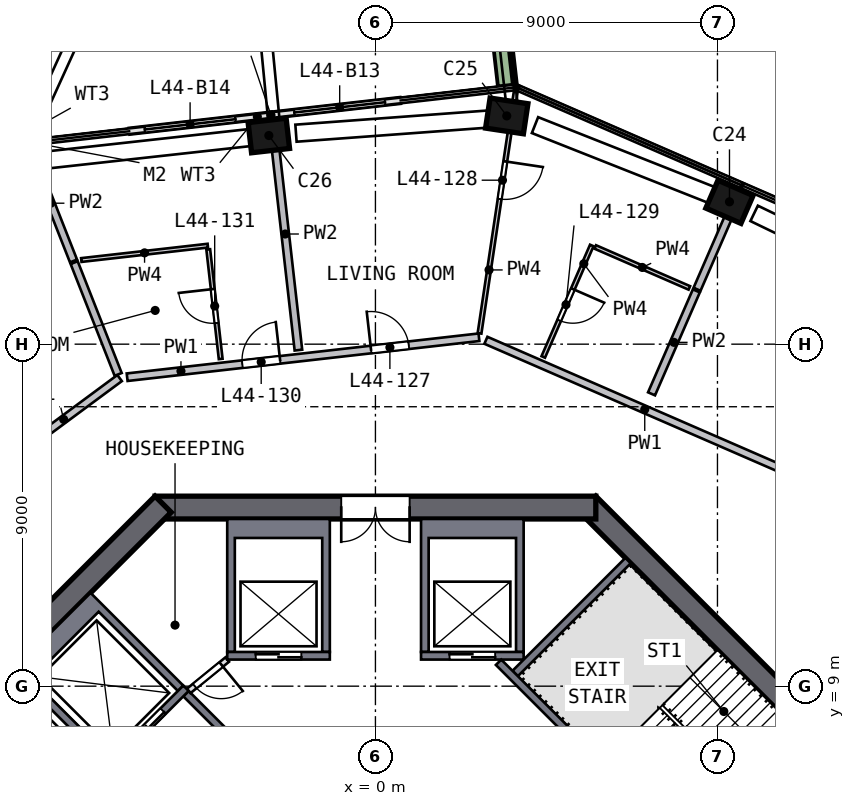
"""IFC4 building model, lengths in metres.
Left out: names, types, materials, properties, quantities, classifications, styles, units other than length and angle.
Written with IfcOpenShell. Run it as: python <this file> out.ifc"""

import sys

from ifc_helpers import new_model, si_unit, direction, frame, frame_2d, origin, origin_2d, place, context, subcontext, project, spatial, polyline, rectangle, outline, extrude, element, fill, save


model = new_model("IFC4")
c1 = context("Model", 3, precision=1e-05, world=origin(), true_north=direction((0.0, 1.0)))
c2 = subcontext(c1, "Body", "Model", "MODEL_VIEW")
j1 = project(units=[si_unit("LENGTHUNIT", "METRE"), si_unit("PLANEANGLEUNIT", "RADIAN")], contexts=[c1])
p1 = place(None, origin())
s1 = spatial("IfcSite", under=j1, at=p1, CompositionType="ELEMENT")
p2 = place(p1, origin())
s2 = spatial("IfcBuilding", under=s1, at=p2, CompositionType="ELEMENT")
p3 = place(p2, frame((0.0, 0.0, 183.5)))
s3 = spatial("IfcBuildingStorey", under=s2, at=p3, CompositionType="ELEMENT", Elevation=183.5)
p4 = place(p3, frame((9.441, 21.693, 0.0), z_axis=(-0.103577696, 0.044031928, 0.99364624), x_axis=(-0.911115934, 0.39648645, -0.112544433)))
e1 = element("IfcColumn", 1, at=p4, inside=s3, PredefinedType="COLUMN", context=c2, shape_type="SweptSolid", body=[
    extrude(rectangle(XDim=1.0, YDim=0.8, at=origin_2d()), origin(), (0.0, 0.0, 1.0), 3.21),
])
p5 = place(p3, frame((3.594, 23.987, 0.0), z_axis=(-0.114187915, 0.016117069, 0.993328425), x_axis=(0.982365713, -0.147173067, 0.115315628)))
e2 = element("IfcColumn", 2, at=p5, inside=s3, PredefinedType="COLUMN", context=c2, shape_type="SweptSolid", body=[
    extrude(rectangle(XDim=1.0, YDim=0.8, at=origin_2d()), origin(), (0.0, 0.0, 1.0), 3.211),
])
p6 = place(p3, frame((-2.67, 23.507, 0.0), z_axis=(-0.111714949, -0.013612645, 0.993647053), x_axis=(-0.987336251, -0.111814551, -0.112537254)))
e3 = element("IfcColumn", 3, at=p6, inside=s3, PredefinedType="COLUMN", context=c2, shape_type="SweptSolid", body=[
    extrude(rectangle(XDim=1.0, YDim=0.8, at=origin_2d()), origin(), (0.0, 0.0, 1.0), 3.21),
])
p7 = place(p3, frame((13.788, 5.587, 0.0), z_axis=(0.0, 0.0, 1.0), x_axis=(-0.707106781, 0.707106781, 0.0)))
e4 = element("IfcWall", 4, at=p7, inside=s3, PredefinedType="SHEAR", context=c2, shape_type="SweptSolid", body=[
    extrude(rectangle(XDim=11.598, YDim=0.6, at=frame_2d((5.799, 0.0))), origin(), (0.0, 0.0, 1.0), 3.5),
])
p8 = place(p7, frame((2.099, 0.0, 0.0)))
e5 = element("IfcOpeningElement", 5, at=p8, cuts=e4, PredefinedType="OPENING", context=c2, shape_type="SweptSolid", body=[
    extrude(rectangle(XDim=1.2, YDim=2.1, at=frame_2d((0.6, 1.05))), frame((0.0, 0.31, 0.0), z_axis=(0.0, -1.0, 0.0), x_axis=(1.0, 0.0, 0.0)), (0.0, 0.0, 1.0), 0.62),
])
p9 = place(p3, frame((5.799, 13.7, 0.0), z_axis=(0.0, 0.0, 1.0), x_axis=(-1.0, 0.0, 0.0)))
e6 = element("IfcWall", 6, at=p9, inside=s3, PredefinedType="SHEAR", context=c2, shape_type="SweptSolid", body=[
    extrude(rectangle(XDim=11.598, YDim=0.6, at=frame_2d((5.799, 0.0))), origin(), (0.0, 0.0, 1.0), 3.5),
])
p10 = place(p9, frame((4.899, 0.0, 0.0)))
e7 = element("IfcOpeningElement", 7, at=p10, cuts=e6, PredefinedType="OPENING", context=c2, shape_type="SweptSolid", body=[
    extrude(rectangle(XDim=1.8, YDim=2.1, at=frame_2d((0.9, 1.05))), frame((0.0, 0.31, 0.0), z_axis=(0.0, -1.0, 0.0), x_axis=(1.0, 0.0, 0.0)), (0.0, 0.0, 1.0), 0.62),
])
p11 = place(p3, frame((-5.587, 13.788, 0.0), z_axis=(0.0, 0.0, 1.0), x_axis=(-0.707106781, -0.707106781, 0.0)))
e8 = element("IfcWall", 8, at=p11, inside=s3, PredefinedType="SHEAR", context=c2, shape_type="SweptSolid", body=[
    extrude(rectangle(XDim=11.598, YDim=0.6, at=frame_2d((5.799, 0.0))), origin(), (0.0, 0.0, 1.0), 3.5),
])
p12 = place(p3, frame((0.649, 24.413, 0.0), z_axis=(0.0, 0.0, 1.0), x_axis=(-0.993608367, -0.112882298, 0.0)))
e9 = element("IfcWall", 9, at=p12, inside=s3, PredefinedType="SOLIDWALL", context=c2, shape_type="SweptSolid", body=[
    extrude(rectangle(XDim=3.4, YDim=0.15, at=frame_2d((1.7, 0.0))), origin(), (0.0, 0.0, 1.0), 2.475),
])
p13 = place(p12, frame((0.4, 0.0, 0.0)))
e10 = element("IfcOpeningElement", 10, at=p13, cuts=e9, PredefinedType="OPENING", context=c2, shape_type="SweptSolid", body=[
    extrude(rectangle(XDim=2.4, YDim=2.4, at=frame_2d((1.2, 1.2))), frame((0.0, 0.085, 0.0), z_axis=(0.0, -1.0, 0.0), x_axis=(1.0, 0.0, 0.0)), (0.0, 0.0, 1.0), 0.17),
])
p14 = place(p3, frame((-2.729, 24.029, 0.0), z_axis=(0.0, 0.0, 1.0), x_axis=(-0.993609226, -0.112874735, 0.0)))
e11 = element("IfcWall", 11, at=p14, inside=s3, PredefinedType="SOLIDWALL", context=c2, shape_type="SweptSolid", body=[
    extrude(rectangle(XDim=3.761, YDim=0.15, at=frame_2d((1.881, 0.0))), origin(), (0.0, 0.0, 1.0), 2.475),
])
p15 = place(p14, frame((0.961, 0.0, 0.0)))
e12 = element("IfcOpeningElement", 12, at=p15, cuts=e11, PredefinedType="OPENING", context=c2, shape_type="SweptSolid", body=[
    extrude(rectangle(XDim=2.4, YDim=2.4, at=frame_2d((1.2, 1.2))), frame((0.0, 0.085, 0.0), z_axis=(0.0, -1.0, 0.0), x_axis=(1.0, 0.0, 0.0)), (0.0, 0.0, 1.0), 0.17),
])
p16 = place(p3, frame((3.472, 24.81, 0.0), z_axis=(0.0, 0.0, 1.0), x_axis=(-0.112801803, 0.993617508, 0.0)))
e13 = element("IfcWall", 13, at=p16, inside=s3, PredefinedType="SOLIDWALL", context=c2, shape_type="SweptSolid", body=[
    extrude(rectangle(XDim=3.199, YDim=0.5, at=frame_2d((1.6, 0.0))), origin(), (0.0, 0.0, 1.0), 0.7),
])
p17 = place(p3, origin())
e14 = element("IfcWall", 14, at=p17, inside=s3, PredefinedType="SOLIDWALL", context=c2, shape_type="SweptSolid", body=[
    extrude(outline(polyline([(3.9, 9.9), (3.7, 9.9), (3.7, 12.9), (1.4, 12.9), (1.4, 9.9), (1.2, 9.9), (1.2, 13.4), (3.9, 13.4), (3.9, 9.9)])), origin(), (0.0, 0.0, 1.0), 3.19),
])
p18 = place(p3, frame((1.2, 9.8, 0.0), z_axis=(0.0, 0.0, 1.0), x_axis=(1.0, 0.0, 0.0)))
e15 = element("IfcWall", 15, at=p18, inside=s3, PredefinedType="SOLIDWALL", context=c2, shape_type="SweptSolid", body=[
    extrude(rectangle(XDim=2.7, YDim=0.2, at=frame_2d((1.35, 0.0))), origin(), (0.0, 0.0, 1.0), 3.19),
])
p19 = place(p18, frame((0.75, 0.0, 0.0)))
e16 = element("IfcOpeningElement", 16, at=p19, cuts=e15, PredefinedType="OPENING", context=c2, shape_type="SweptSolid", body=[
    extrude(rectangle(XDim=1.2, YDim=2.1, at=frame_2d((0.6, 1.05))), frame((0.0, 0.11, 0.0), z_axis=(0.0, -1.0, 0.0), x_axis=(1.0, 0.0, 0.0)), (0.0, 0.0, 1.0), 0.22),
])
p20 = place(p3, origin())
e17 = element("IfcWall", 17, at=p20, inside=s3, PredefinedType="SOLIDWALL", context=c2, shape_type="SweptSolid", body=[
    extrude(outline(polyline([(-3.9, 13.4), (-1.2, 13.4), (-1.2, 9.9), (-1.4, 9.9), (-1.4, 12.9), (-3.7, 12.9), (-3.7, 9.9), (-3.9, 9.9), (-3.9, 13.4)])), origin(), (0.0, 0.0, 1.0), 3.19),
])
p21 = place(p3, frame((-1.2, 9.8, 0.0), z_axis=(0.0, 0.0, 1.0), x_axis=(-1.0, 0.0, 0.0)))
e18 = element("IfcWall", 18, at=p21, inside=s3, PredefinedType="SOLIDWALL", context=c2, shape_type="SweptSolid", body=[
    extrude(rectangle(XDim=2.7, YDim=0.2, at=frame_2d((1.35, 0.0))), origin(), (0.0, 0.0, 1.0), 3.19),
])
p22 = place(p21, frame((0.75, 0.0, 0.0)))
e19 = element("IfcOpeningElement", 19, at=p22, cuts=e18, PredefinedType="OPENING", context=c2, shape_type="SweptSolid", body=[
    extrude(rectangle(XDim=1.2, YDim=2.1, at=frame_2d((0.6, 1.05))), frame((0.0, 0.11, 0.0), z_axis=(0.0, -1.0, 0.0), x_axis=(1.0, 0.0, 0.0)), (0.0, 0.0, 1.0), 0.22),
])
p23 = place(p3, origin())
e20 = element("IfcWall", 20, at=p23, inside=s3, PredefinedType="SOLIDWALL", context=c2, shape_type="SweptSolid", body=[
    extrude(outline(polyline([(-9.546, 9.405), (-7.495, 11.455), (-5.056, 9.016), (-5.197, 8.874), (-7.283, 10.96), (-9.051, 9.192), (-6.965, 7.106), (-7.106, 6.965), (-9.546, 9.405)])), origin(), (0.0, 0.0, 1.0), 3.19),
])
p24 = place(p3, frame((-4.985, 8.945, 0.0), z_axis=(0.0, 0.0, 1.0), x_axis=(-0.707106781, -0.707106781, 0.0)))
e21 = element("IfcWall", 21, at=p24, inside=s3, PredefinedType="SOLIDWALL", context=c2, shape_type="SweptSolid", body=[
    extrude(rectangle(XDim=2.9, YDim=0.2, at=frame_2d((1.45, 0.0))), origin(), (0.0, 0.0, 1.0), 3.19),
])
p25 = place(p24, frame((0.85, 0.0, 0.0)))
e22 = element("IfcOpeningElement", 22, at=p25, cuts=e21, PredefinedType="OPENING", context=c2, shape_type="SweptSolid", body=[
    extrude(rectangle(XDim=1.2, YDim=2.1, at=frame_2d((0.6, 1.05))), frame((0.0, 0.11, 0.0), z_axis=(0.0, -1.0, 0.0), x_axis=(1.0, 0.0, 0.0)), (0.0, 0.0, 1.0), 0.22),
])
p26 = place(p3, frame((3.24, 9.629, 0.0), z_axis=(0.0, 0.0, 1.0), x_axis=(0.707106781, -0.707106781, 0.0)))
e23 = element("IfcWall", 23, at=p26, inside=s3, PredefinedType="SOLIDWALL", context=c2, shape_type="SweptSolid", body=[
    extrude(rectangle(XDim=9.036, YDim=0.2, at=frame_2d((4.518, 0.0))), origin(), (0.0, 0.0, 1.0), 3.19),
])
p27 = place(p26, frame((7.018, 0.0, 0.0)))
e24 = element("IfcOpeningElement", 24, at=p27, cuts=e23, PredefinedType="OPENING", context=c2, shape_type="SweptSolid", body=[
    extrude(rectangle(XDim=1.2, YDim=2.1, at=frame_2d((0.6, 1.05))), frame((0.0, 0.11, 0.0), z_axis=(0.0, -1.0, 0.0), x_axis=(1.0, 0.0, 0.0)), (0.0, 0.0, 1.0), 0.22),
])
p28 = place(p3, frame((3.677, 9.334, 0.0), z_axis=(0.0, 0.0, 1.0), x_axis=(0.707077716, 0.707135845, 0.0)))
e25 = element("IfcWall", 25, at=p28, inside=s3, PredefinedType="SOLIDWALL", context=c2, shape_type="SweptSolid", body=[
    extrude(rectangle(XDim=4.2, YDim=0.2, at=frame_2d((2.1, 0.0))), origin(), (0.0, 0.0, 1.0), 3.19),
])
p29 = place(p3, frame((-3.005, 6.823, 0.0), z_axis=(0.0, 0.0, 1.0), x_axis=(-0.707106781, 0.707106781, 0.0)))
e26 = element("IfcWall", 26, at=p29, inside=s3, PredefinedType="SOLIDWALL", context=c2, shape_type="SweptSolid", body=[
    extrude(rectangle(XDim=2.8, YDim=0.2, at=frame_2d((1.4, 0.0))), origin(), (0.0, 0.0, 1.0), 3.19),
])
p30 = place(p3, frame((-3.9, 9.7, 0.0), z_axis=(0.0, 0.0, 1.0), x_axis=(-0.775559878, -0.631274009, 0.0)))
e27 = element("IfcWall", 27, at=p30, inside=s3, PredefinedType="PARTITIONING", context=c2, shape_type="SweptSolid", body=[
    extrude(rectangle(XDim=1.308, YDim=0.15, at=frame_2d((0.654, 0.0))), origin(), (0.0, 0.0, 1.0), 3.19),
])
p31 = place(p30, frame((0.204, 0.0, 0.0)))
e28 = element("IfcOpeningElement", 28, at=p31, cuts=e27, PredefinedType="OPENING", context=c2, shape_type="SweptSolid", body=[
    extrude(rectangle(XDim=0.9, YDim=2.1, at=frame_2d((0.45, 1.05))), frame((0.0, 0.085, 0.0), z_axis=(0.0, -1.0, 0.0), x_axis=(1.0, 0.0, 0.0)), (0.0, 0.0, 1.0), 0.17),
])
p32 = place(p3, frame((-14.384, 11.45, 0.0), z_axis=(0.0, 0.0, 1.0), x_axis=(0.804051366, 0.594559838, 0.0)))
e29 = element("IfcWall", 29, at=p32, inside=s3, PredefinedType="SOLIDWALL", context=c2, shape_type="SweptSolid", body=[
    extrude(rectangle(XDim=9.517, YDim=0.2, at=frame_2d((4.758, 0.0))), origin(), (0.0, 0.0, 1.0), 3.19),
])
p33 = place(p32, frame((3.857, 0.0, 0.0)))
e30 = element("IfcOpeningElement", 30, at=p33, cuts=e29, PredefinedType="OPENING", context=c2, shape_type="SweptSolid", body=[
    extrude(rectangle(XDim=1.8, YDim=2.1, at=frame_2d((0.9, 1.05))), frame((0.0, 0.11, 0.0), z_axis=(0.0, -1.0, 0.0), x_axis=(1.0, 0.0, 0.0)), (0.0, 0.0, 1.0), 0.22),
])
p34 = place(p3, frame((-6.533, 17.13, 0.0), z_axis=(0.0, 0.0, 1.0), x_axis=(0.993610399, 0.112864414, 0.0)))
e31 = element("IfcWall", 31, at=p34, inside=s3, PredefinedType="SOLIDWALL", context=c2, shape_type="SweptSolid", body=[
    extrude(rectangle(XDim=9.317, YDim=0.2, at=frame_2d((4.658, 0.0))), origin(), (0.0, 0.0, 1.0), 3.19),
])
p35 = place(p34, frame((6.458, 0.0, 0.0)))
e32 = element("IfcOpeningElement", 32, at=p35, cuts=e31, PredefinedType="OPENING", context=c2, shape_type="SweptSolid", body=[
    extrude(rectangle(XDim=1.0, YDim=2.1, at=frame_2d((0.5, 1.05))), frame((0.0, 0.11, 0.0), z_axis=(0.0, -1.0, 0.0), x_axis=(1.0, 0.0, 0.0)), (0.0, 0.0, 1.0), 0.22),
])
p36 = place(p34, frame((3.05, 0.0, 0.0)))
e33 = element("IfcOpeningElement", 33, at=p36, cuts=e31, PredefinedType="OPENING", context=c2, shape_type="SweptSolid", body=[
    extrude(rectangle(XDim=1.0, YDim=2.1, at=frame_2d((0.5, 1.05))), frame((0.0, 0.11, 0.0), z_axis=(0.0, -1.0, 0.0), x_axis=(1.0, 0.0, 0.0)), (0.0, 0.0, 1.0), 0.22),
])
p37 = place(p3, frame((11.266, 14.464, 0.0), z_axis=(0.0, 0.0, 1.0), x_axis=(-0.916919691, 0.399071774, 0.0)))
e34 = element("IfcWall", 34, at=p37, inside=s3, PredefinedType="SOLIDWALL", context=c2, shape_type="SweptSolid", body=[
    extrude(rectangle(XDim=9.116, YDim=0.2, at=frame_2d((4.558, 0.0))), origin(), (0.0, 0.0, 1.0), 3.19),
])
p38 = place(p3, frame((-9.141, 23.23, 0.0), z_axis=(0.0, 0.0, 1.0), x_axis=(0.366220798, -0.930527983, 0.0)))
e35 = element("IfcWall", 35, at=p38, inside=s3, PredefinedType="SOLIDWALL", context=c2, shape_type="SweptSolid", body=[
    extrude(rectangle(XDim=3.269, YDim=0.2, at=frame_2d((1.634, 0.0))), origin(), (0.0, 0.0, 1.0), 3.19),
])
p39 = place(p3, frame((-7.927, 20.146, 0.0), z_axis=(0.0, 0.0, 1.0), x_axis=(0.366125405, -0.93056552, 0.0)))
e36 = element("IfcWall", 36, at=p39, inside=s3, PredefinedType="SOLIDWALL", context=c2, shape_type="SweptSolid", body=[
    extrude(rectangle(XDim=3.161, YDim=0.2, at=frame_2d((1.581, 0.0))), origin(), (0.0, 0.0, 1.0), 3.19),
])
p40 = place(p3, frame((-2.027, 17.844, 0.0), z_axis=(0.0, 0.0, 1.0), x_axis=(-0.112858027, 0.993611124, 0.0)))
e37 = element("IfcWall", 37, at=p40, inside=s3, PredefinedType="SOLIDWALL", context=c2, shape_type="SweptSolid", body=[
    extrude(rectangle(XDim=6.15, YDim=0.2, at=frame_2d((3.075, 0.0))), origin(), (0.0, 0.0, 1.0), 3.19),
])
p41 = place(p3, frame((7.265, 16.693, 0.0), z_axis=(0.0, 0.0, 1.0), x_axis=(0.399019171, 0.916942584, 0.0)))
e38 = element("IfcWall", 38, at=p41, inside=s3, PredefinedType="SOLIDWALL", context=c2, shape_type="SweptSolid", body=[
    extrude(rectangle(XDim=2.955, YDim=0.2, at=frame_2d((1.477, 0.0))), origin(), (0.0, 0.0, 1.0), 3.19),
])
p42 = place(p3, frame((8.463, 19.445, 0.0), z_axis=(0.0, 0.0, 1.0), x_axis=(0.399030644, 0.916937591, 0.0)))
e39 = element("IfcWall", 39, at=p42, inside=s3, PredefinedType="SOLIDWALL", context=c2, shape_type="SweptSolid", body=[
    extrude(rectangle(XDim=2.902, YDim=0.2, at=frame_2d((1.451, 0.0))), origin(), (0.0, 0.0, 1.0), 3.19),
])
p43 = place(p3, frame((-7.74, 20.214, 0.0), z_axis=(0.0, 0.0, 1.0), x_axis=(0.993617882, 0.11279851, 0.0)))
e40 = element("IfcWall", 40, at=p43, inside=s3, PredefinedType="PARTITIONING", context=c2, shape_type="SweptSolid", body=[
    extrude(rectangle(XDim=3.351, YDim=0.1, at=frame_2d((1.675, 0.0))), origin(), (0.0, 0.0, 1.0), 3.19),
])
p44 = place(p3, frame((-4.072, 17.611, 0.0), z_axis=(0.0, 0.0, 1.0), x_axis=(-0.1128058, 0.993617055, 0.0)))
e41 = element("IfcWall", 41, at=p44, inside=s3, PredefinedType="PARTITIONING", context=c2, shape_type="SweptSolid", body=[
    extrude(rectangle(XDim=2.9, YDim=0.1, at=frame_2d((1.45, 0.0))), origin(), (0.0, 0.0, 1.0), 3.19),
])
p45 = place(p44, frame((0.95, 0.0, 0.0)))
e42 = element("IfcOpeningElement", 42, at=p45, cuts=e41, PredefinedType="OPENING", context=c2, shape_type="SweptSolid", body=[
    extrude(rectangle(XDim=0.9, YDim=2.1, at=frame_2d((0.45, 1.05))), frame((0.0, 0.06, 0.0), z_axis=(0.0, -1.0, 0.0), x_axis=(1.0, 0.0, 0.0)), (0.0, 0.0, 1.0), 0.12),
])
p46 = place(p3, frame((3.698, 24.689, 0.0), z_axis=(0.0, 0.0, 1.0), x_axis=(-0.148157946, -0.988963712, 0.0)))
e43 = element("IfcWall", 43, at=p46, inside=s3, PredefinedType="PARTITIONING", context=c2, shape_type="SweptSolid", body=[
    extrude(rectangle(XDim=6.476, YDim=0.1, at=frame_2d((3.238, 0.0))), origin(), (0.0, 0.0, 1.0), 3.19),
])
p47 = place(p46, frame((1.9, 0.0, 0.0)))
e44 = element("IfcOpeningElement", 44, at=p47, cuts=e43, PredefinedType="OPENING", context=c2, shape_type="SweptSolid", body=[
    extrude(rectangle(XDim=1.0, YDim=2.1, at=frame_2d((0.5, 1.05))), frame((0.0, 0.06, 0.0), z_axis=(0.0, -1.0, 0.0), x_axis=(1.0, 0.0, 0.0)), (0.0, 0.0, 1.0), 0.12),
])
p48 = place(p3, frame((5.693, 20.598, 0.0), z_axis=(0.0, 0.0, 1.0), x_axis=(-0.399032975, -0.916936576, 0.0)))
e45 = element("IfcWall", 45, at=p48, inside=s3, PredefinedType="PARTITIONING", context=c2, shape_type="SweptSolid", body=[
    extrude(rectangle(XDim=3.2, YDim=0.1, at=frame_2d((1.6, 0.0))), origin(), (0.0, 0.0, 1.0), 3.19),
])
p49 = place(p48, frame((1.25, 0.0, 0.0)))
e46 = element("IfcOpeningElement", 46, at=p49, cuts=e45, PredefinedType="OPENING", context=c2, shape_type="SweptSolid", body=[
    extrude(rectangle(XDim=0.9, YDim=2.1, at=frame_2d((0.45, 1.05))), frame((0.0, 0.06, 0.0), z_axis=(0.0, -1.0, 0.0), x_axis=(1.0, 0.0, 0.0)), (0.0, 0.0, 1.0), 0.12),
])
p50 = place(p3, frame((8.26, 19.48, 0.0), z_axis=(0.0, 0.0, 1.0), x_axis=(-0.916894583, 0.399129457, 0.0)))
e47 = element("IfcWall", 47, at=p50, inside=s3, PredefinedType="PARTITIONING", context=c2, shape_type="SweptSolid", body=[
    extrude(rectangle(XDim=2.7, YDim=0.1, at=frame_2d((1.35, 0.0))), origin(), (0.0, 0.0, 1.0), 3.19),
])
p51 = place(p13, origin())
e48 = element("IfcDoor", 48, at=p51, inside=s3, OperationType="SLIDING_TO_RIGHT", PredefinedType="DOOR", context=c2, shape_type="SweptSolid", body=[
    extrude(rectangle(XDim=2.4, YDim=2.4, at=frame_2d((1.2, 1.2))), frame((0.0, 0.025, 0.0), z_axis=(0.0, -1.0, 0.0), x_axis=(1.0, 0.0, 0.0)), (0.0, 0.0, 1.0), 0.05),
])
fill(e10, e48)
p52 = place(p15, origin())
e49 = element("IfcDoor", 49, at=p52, inside=s3, OperationType="SLIDING_TO_LEFT", PredefinedType="DOOR", context=c2, shape_type="SweptSolid", body=[
    extrude(rectangle(XDim=2.4, YDim=2.4, at=frame_2d((1.2, 1.2))), frame((0.0, 0.025, 0.0), z_axis=(0.0, -1.0, 0.0), x_axis=(1.0, 0.0, 0.0)), (0.0, 0.0, 1.0), 0.05),
])
fill(e12, e49)
p53 = place(p19, origin())
e50 = element("IfcDoor", 50, at=p53, inside=s3, OperationType="DOUBLE_DOOR_SLIDING", PredefinedType="DOOR", context=c2, shape_type="SweptSolid", body=[
    extrude(rectangle(XDim=1.2, YDim=2.1, at=frame_2d((0.6, 1.05))), frame((0.0, 0.025, 0.0), z_axis=(0.0, -1.0, 0.0), x_axis=(1.0, 0.0, 0.0)), (0.0, 0.0, 1.0), 0.05),
])
fill(e16, e50)
p54 = place(p22, origin())
e51 = element("IfcDoor", 51, at=p54, inside=s3, OperationType="DOUBLE_DOOR_SLIDING", PredefinedType="DOOR", context=c2, shape_type="SweptSolid", body=[
    extrude(rectangle(XDim=1.2, YDim=2.1, at=frame_2d((0.6, 1.05))), frame((0.0, 0.025, 0.0), z_axis=(0.0, -1.0, 0.0), x_axis=(1.0, 0.0, 0.0)), (0.0, 0.0, 1.0), 0.05),
])
fill(e19, e51)
p55 = place(p25, origin())
e52 = element("IfcDoor", 52, at=p55, inside=s3, OperationType="DOUBLE_DOOR_SLIDING", PredefinedType="DOOR", context=c2, shape_type="SweptSolid", body=[
    extrude(rectangle(XDim=1.2, YDim=2.1, at=frame_2d((0.6, 1.05))), frame((0.0, 0.025, 0.0), z_axis=(0.0, -1.0, 0.0), x_axis=(1.0, 0.0, 0.0)), (0.0, 0.0, 1.0), 0.05),
])
fill(e22, e52)
p56 = place(p10, origin())
e53 = element("IfcDoor", 53, at=p56, inside=s3, OperationType="DOUBLE_DOOR_SINGLE_SWING", PredefinedType="DOOR", context=c2, shape_type="SweptSolid", body=[
    extrude(rectangle(XDim=1.8, YDim=2.1, at=frame_2d((0.9, 1.05))), frame((0.0, 0.025, 0.0), z_axis=(0.0, -1.0, 0.0), x_axis=(1.0, 0.0, 0.0)), (0.0, 0.0, 1.0), 0.05),
])
fill(e7, e53)
p57 = place(p31, origin())
e54 = element("IfcDoor", 54, at=p57, inside=s3, OperationType="SINGLE_SWING_LEFT", PredefinedType="DOOR", context=c2, shape_type="SweptSolid", body=[
    extrude(rectangle(XDim=0.9, YDim=2.1, at=frame_2d((0.45, 1.05))), frame((0.0, 0.025, 0.0), z_axis=(0.0, -1.0, 0.0), x_axis=(1.0, 0.0, 0.0)), (0.0, 0.0, 1.0), 0.05),
])
fill(e28, e54)
p58 = place(p35, origin())
e55 = element("IfcDoor", 55, at=p58, inside=s3, OperationType="SINGLE_SWING_LEFT", PredefinedType="DOOR", context=c2, shape_type="SweptSolid", body=[
    extrude(rectangle(XDim=1.0, YDim=2.1, at=frame_2d((0.5, 1.05))), frame((0.0, 0.025, 0.0), z_axis=(0.0, -1.0, 0.0), x_axis=(1.0, 0.0, 0.0)), (0.0, 0.0, 1.0), 0.05),
])
fill(e32, e55)
p59 = place(p47, origin())
e56 = element("IfcDoor", 56, at=p59, inside=s3, OperationType="SINGLE_SWING_LEFT", PredefinedType="DOOR", context=c2, shape_type="SweptSolid", body=[
    extrude(rectangle(XDim=1.0, YDim=2.1, at=frame_2d((0.5, 1.05))), frame((0.0, 0.025, 0.0), z_axis=(0.0, -1.0, 0.0), x_axis=(1.0, 0.0, 0.0)), (0.0, 0.0, 1.0), 0.05),
])
fill(e44, e56)
p60 = place(p49, origin())
e57 = element("IfcDoor", 57, at=p60, inside=s3, OperationType="SINGLE_SWING_LEFT", PredefinedType="DOOR", context=c2, shape_type="SweptSolid", body=[
    extrude(rectangle(XDim=0.9, YDim=2.1, at=frame_2d((0.45, 1.05))), frame((0.0, 0.025, 0.0), z_axis=(0.0, -1.0, 0.0), x_axis=(1.0, 0.0, 0.0)), (0.0, 0.0, 1.0), 0.05),
])
fill(e46, e57)
p61 = place(p36, origin())
e58 = element("IfcDoor", 58, at=p61, inside=s3, OperationType="SINGLE_SWING_RIGHT", PredefinedType="DOOR", context=c2, shape_type="SweptSolid", body=[
    extrude(rectangle(XDim=1.0, YDim=2.1, at=frame_2d((0.5, 1.05))), frame((0.0, 0.025, 0.0), z_axis=(0.0, -1.0, 0.0), x_axis=(1.0, 0.0, 0.0)), (0.0, 0.0, 1.0), 0.05),
])
fill(e33, e58)
p62 = place(p45, origin())
e59 = element("IfcDoor", 59, at=p62, inside=s3, OperationType="SINGLE_SWING_RIGHT", PredefinedType="DOOR", context=c2, shape_type="SweptSolid", body=[
    extrude(rectangle(XDim=0.9, YDim=2.1, at=frame_2d((0.45, 1.05))), frame((0.0, 0.025, 0.0), z_axis=(0.0, -1.0, 0.0), x_axis=(1.0, 0.0, 0.0)), (0.0, 0.0, 1.0), 0.05),
])
fill(e42, e59)
save(model, sys.argv[1])
